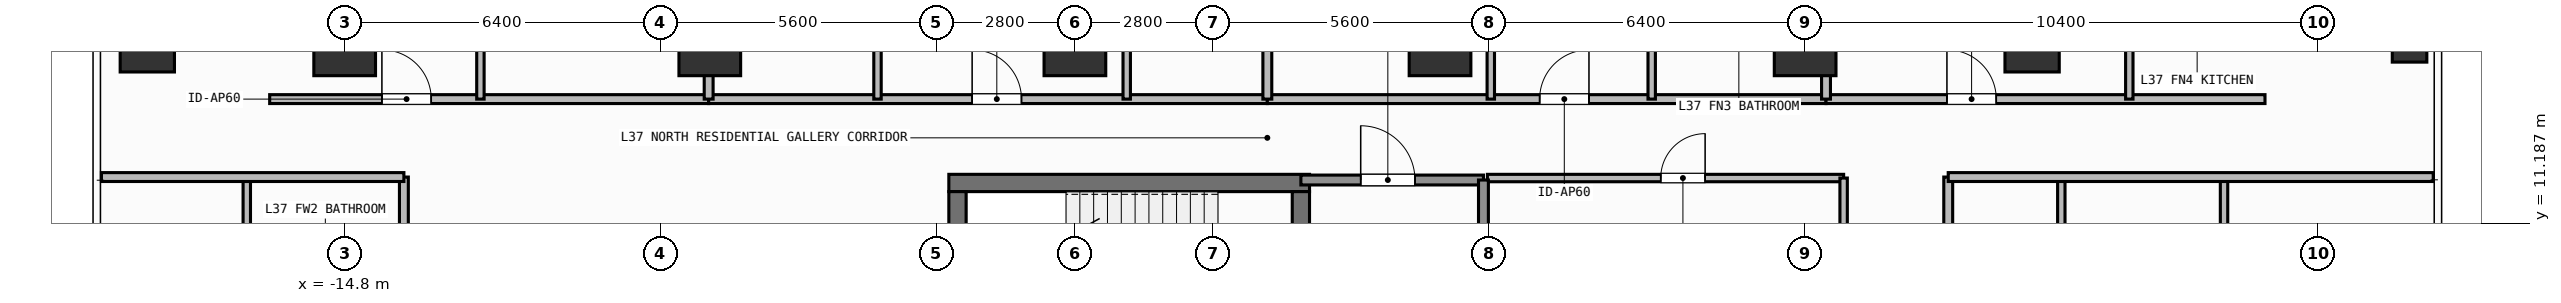
"""IFC4 building model, lengths in metres.
Left out: names, types, materials, properties, quantities, classifications, styles, units other than length and angle.
Written with IfcOpenShell. Run it as: python <this file> out.ifc"""

import sys

from ifc_helpers import new_model, si_unit, direction, frame, frame_2d, origin, origin_2d, place, context, subcontext, project, spatial, rectangle, hollow_rectangle, extrude, element, fill, save


model = new_model("IFC4")
c1 = context("Model", 3, precision=1e-05, world=origin(), true_north=direction((0.0, 1.0)))
c2 = subcontext(c1, "Body", "Model", "MODEL_VIEW")
j1 = project(units=[si_unit("LENGTHUNIT", "METRE"), si_unit("PLANEANGLEUNIT", "RADIAN")], contexts=[c1])
p1 = place(None, origin())
s1 = spatial("IfcSite", under=j1, at=p1, CompositionType="ELEMENT")
p2 = place(p1, origin())
s2 = spatial("IfcBuilding", under=s1, at=p2, CompositionType="ELEMENT")
p3 = place(p2, frame((0.0, 0.0, 148.5)))
s3 = spatial("IfcBuildingStorey", under=s2, at=p3, CompositionType="ELEMENT", Elevation=148.5)
p4 = place(p3, frame((-2.555, 12.0, 0.0), z_axis=(0.0, 0.0, 1.0), x_axis=(1.0, 0.0, 0.0)))
e1 = element("IfcWall", 1, at=p4, inside=s3, PredefinedType="SHEAR", context=c2, shape_type="SweptSolid", body=[
    extrude(rectangle(XDim=7.31, YDim=0.35, at=frame_2d((3.655, 0.0))), origin(), (0.0, 0.0, 1.0), 3.9),
])
p5 = place(p3, frame((-2.38, 8.9, 0.0), z_axis=(0.0, 0.0, 1.0), x_axis=(0.0, 1.0, 0.0)))
e2 = element("IfcWall", 2, at=p5, inside=s3, PredefinedType="SHEAR", context=c2, shape_type="SweptSolid", body=[
    extrude(rectangle(XDim=2.925, YDim=0.35, at=frame_2d((1.462, 0.0))), origin(), (0.0, 0.0, 1.0), 3.9),
])
p6 = place(p3, frame((4.58, 11.825, 0.0), z_axis=(0.0, 0.0, 1.0), x_axis=(0.0, -1.0, 0.0)))
e3 = element("IfcWall", 3, at=p6, inside=s3, PredefinedType="SHEAR", context=c2, shape_type="SweptSolid", body=[
    extrude(rectangle(XDim=2.925, YDim=0.35, at=frame_2d((1.462, 0.0))), origin(), (0.0, 0.0, 1.0), 3.9),
])
p7 = place(p6, frame((0.913, 0.0, 0.0)))
e4 = element("IfcOpeningElement", 4, at=p7, cuts=e3, PredefinedType="OPENING", context=c2, shape_type="SweptSolid", body=[
    extrude(rectangle(XDim=1.1, YDim=2.15, at=frame_2d((0.55, 1.075))), frame((0.0, 0.185, 0.0), z_axis=(0.0, -1.0, 0.0), x_axis=(1.0, 0.0, 0.0)), (0.0, 0.0, 1.0), 0.37),
])
for number, where, z_axis, x_axis in (
    (5, (-14.8, 14.8, 0.0), (0.0, 0.0, 1.0), (1.0, 0.0, 0.0)),
    (6, (-7.4, 14.8, 0.0), (0.0, 0.0, 1.0), (1.0, 0.0, 0.0)),
    (7, (0.0, 14.8, 0.0), (0.0, 0.0, 1.0), (1.0, 0.0, 0.0)),
    (8, (7.4, 14.8, 0.0), (0.0, 0.0, 1.0), (1.0, 0.0, 0.0)),
    (9, (14.8, 14.8, 0.0), (0.0, 0.0, 1.0), (1.0, 0.0, 0.0)),
):
    element("IfcColumn", number, at=place(p3, frame(where, z_axis=z_axis, x_axis=x_axis)), inside=s3, PredefinedType="COLUMN", context=c2, shape_type="SweptSolid", body=[
        extrude(rectangle(XDim=1.25, YDim=1.25, at=origin_2d()), origin(), (0.0, 0.0, 1.0), 3.9),
    ])
for number, where, z_axis, x_axis in (
    (10, (-18.8, 14.8, 0.0), (0.0, 0.0, 1.0), (1.0, 0.0, 0.0)),
    (11, (19.4, 14.8, 0.0), (0.0, 0.0, 1.0), (1.0, 0.0, 0.0)),
):
    element("IfcColumn", number, at=place(p3, frame(where, z_axis=z_axis, x_axis=x_axis)), inside=s3, PredefinedType="COLUMN", context=c2, shape_type="SweptSolid", body=[
        extrude(rectangle(XDim=1.1, YDim=1.1, at=origin_2d()), origin(), (0.0, 0.0, 1.0), 3.9),
    ])
p8 = place(p3, frame((27.05, 14.8, 0.0), z_axis=(0.0, 0.0, 1.0), x_axis=(1.0, 0.0, 0.0)))
e12 = element("IfcColumn", 12, at=p8, inside=s3, PredefinedType="COLUMN", context=c2, shape_type="SweptSolid", body=[
    extrude(hollow_rectangle(XDim=0.7, YDim=0.7, WallThickness=0.032, at=origin_2d()), origin(), (0.0, 0.0, 1.0), 3.9),
])
p9 = place(p3, frame((4.58, 12.06, 0.0), z_axis=(0.0, 0.0, 1.0), x_axis=(1.0, 0.0, 0.0)))
e13 = element("IfcWall", 13, at=p9, inside=s3, PredefinedType="SOLIDWALL", context=c2, shape_type="SweptSolid", body=[
    extrude(rectangle(XDim=3.7, YDim=0.2, at=frame_2d((1.85, 0.0))), origin(), (0.0, 0.0, 1.0), 3.68),
])
p10 = place(p9, frame((1.212, 0.0, 0.0)))
e14 = element("IfcOpeningElement", 14, at=p10, cuts=e13, PredefinedType="OPENING", context=c2, shape_type="SweptSolid", body=[
    extrude(rectangle(XDim=1.1, YDim=2.15, at=frame_2d((0.55, 1.075))), frame((0.0, 0.11, 0.0), z_axis=(0.0, -1.0, 0.0), x_axis=(1.0, 0.0, 0.0)), (0.0, 0.0, 1.0), 0.22),
])
p11 = place(p3, frame((8.36, 12.1, 0.0), z_axis=(0.0, 0.0, 1.0), x_axis=(1.0, 0.0, 0.0)))
e15 = element("IfcWall", 15, at=p11, inside=s3, PredefinedType="PARTITIONING", context=c2, shape_type="SweptSolid", body=[
    extrude(rectangle(XDim=7.22, YDim=0.15, at=frame_2d((3.61, 0.0))), origin(), (0.0, 0.0, 1.0), 3.68),
])
p12 = place(p11, frame((3.513, 0.0, 0.0)))
e16 = element("IfcOpeningElement", 16, at=p12, cuts=e15, PredefinedType="OPENING", context=c2, shape_type="SweptSolid", body=[
    extrude(rectangle(XDim=0.9, YDim=2.1, at=frame_2d((0.45, 1.05))), frame((0.0, 0.085, 0.0), z_axis=(0.0, -1.0, 0.0), x_axis=(1.0, 0.0, 0.0)), (0.0, 0.0, 1.0), 0.17),
])
p13 = place(p3, frame((-16.32, 13.7, 0.0), z_axis=(0.0, 0.0, 1.0), x_axis=(1.0, 0.0, 0.0)))
e17 = element("IfcWall", 17, at=p13, inside=s3, PredefinedType="PARTITIONING", context=c2, shape_type="SweptSolid", body=[
    extrude(rectangle(XDim=8.897, YDim=0.18, at=frame_2d((4.448, 0.0))), origin(), (0.0, 0.0, 1.0), 3.68),
])
p14 = place(p13, frame((2.274, 0.0, 0.0)))
e18 = element("IfcOpeningElement", 18, at=p14, cuts=e17, PredefinedType="OPENING", context=c2, shape_type="SweptSolid", body=[
    extrude(rectangle(XDim=1.0, YDim=2.2, at=frame_2d((0.5, 1.1))), frame((0.0, 0.1, 0.0), z_axis=(0.0, -1.0, 0.0), x_axis=(1.0, 0.0, 0.0)), (0.0, 0.0, 1.0), 0.2),
])
p15 = place(p3, frame((-12.049, 13.7, 0.0), z_axis=(0.0, 0.0, 1.0), x_axis=(0.0, 1.0, 0.0)))
e19 = element("IfcWall", 19, at=p15, inside=s3, PredefinedType="PARTITIONING", context=c2, shape_type="SweptSolid", body=[
    extrude(rectangle(XDim=3.138, YDim=0.15, at=frame_2d((1.569, 0.0))), origin(), (0.0, 0.0, 1.0), 3.68),
])
p16 = place(p15, frame((1.233, 0.0, 0.0)))
e20 = element("IfcOpeningElement", 20, at=p16, cuts=e19, PredefinedType="OPENING", context=c2, shape_type="SweptSolid", body=[
    extrude(rectangle(XDim=0.85, YDim=2.1, at=frame_2d((0.425, 1.05))), frame((0.0, 0.085, 0.0), z_axis=(0.0, -1.0, 0.0), x_axis=(1.0, 0.0, 0.0)), (0.0, 0.0, 1.0), 0.17),
])
p17 = place(p3, frame((-7.423, 13.7, 0.0), z_axis=(0.0, 0.0, 1.0), x_axis=(1.0, 0.0, 0.0)))
e21 = element("IfcWall", 21, at=p17, inside=s3, PredefinedType="PARTITIONING", context=c2, shape_type="SweptSolid", body=[
    extrude(rectangle(XDim=11.323, YDim=0.18, at=frame_2d((5.662, 0.0))), origin(), (0.0, 0.0, 1.0), 3.68),
])
p18 = place(p17, frame((5.34, 0.0, 0.0)))
e22 = element("IfcOpeningElement", 22, at=p18, cuts=e21, PredefinedType="OPENING", context=c2, shape_type="SweptSolid", body=[
    extrude(rectangle(XDim=1.0, YDim=2.2, at=frame_2d((0.5, 1.1))), frame((0.0, 0.1, 0.0), z_axis=(0.0, -1.0, 0.0), x_axis=(1.0, 0.0, 0.0)), (0.0, 0.0, 1.0), 0.2),
])
p19 = place(p3, frame((-4.001, 13.7, 0.0), z_axis=(0.0, 0.0, 1.0), x_axis=(0.0, 1.0, 0.0)))
e23 = element("IfcWall", 23, at=p19, inside=s3, PredefinedType="PARTITIONING", context=c2, shape_type="SweptSolid", body=[
    extrude(rectangle(XDim=5.845, YDim=0.15, at=frame_2d((2.922, 0.0))), origin(), (0.0, 0.0, 1.0), 3.68),
])
p20 = place(p19, frame((2.498, 0.0, 0.0)))
e24 = element("IfcOpeningElement", 24, at=p20, cuts=e23, PredefinedType="OPENING", context=c2, shape_type="SweptSolid", body=[
    extrude(rectangle(XDim=0.85, YDim=2.1, at=frame_2d((0.425, 1.05))), frame((0.0, 0.085, 0.0), z_axis=(0.0, -1.0, 0.0), x_axis=(1.0, 0.0, 0.0)), (0.0, 0.0, 1.0), 0.17),
])
p21 = place(p3, frame((1.05, 13.7, 0.0), z_axis=(0.0, 0.0, 1.0), x_axis=(0.0, 1.0, 0.0)))
e25 = element("IfcWall", 25, at=p21, inside=s3, PredefinedType="PARTITIONING", context=c2, shape_type="SweptSolid", body=[
    extrude(rectangle(XDim=5.845, YDim=0.15, at=frame_2d((2.922, 0.0))), origin(), (0.0, 0.0, 1.0), 3.68),
])
p22 = place(p21, frame((2.498, 0.0, 0.0)))
e26 = element("IfcOpeningElement", 26, at=p22, cuts=e25, PredefinedType="OPENING", context=c2, shape_type="SweptSolid", body=[
    extrude(rectangle(XDim=0.85, YDim=2.1, at=frame_2d((0.425, 1.05))), frame((0.0, 0.085, 0.0), z_axis=(0.0, -1.0, 0.0), x_axis=(1.0, 0.0, 0.0)), (0.0, 0.0, 1.0), 0.17),
])
p23 = place(p3, frame((3.9, 13.7, 0.0), z_axis=(0.0, 0.0, 1.0), x_axis=(1.0, 0.0, 0.0)))
e27 = element("IfcWall", 27, at=p23, inside=s3, PredefinedType="PARTITIONING", context=c2, shape_type="SweptSolid", body=[
    extrude(rectangle(XDim=11.323, YDim=0.18, at=frame_2d((5.662, 0.0))), origin(), (0.0, 0.0, 1.0), 3.68),
])
p24 = place(p23, frame((5.519, 0.0, 0.0)))
e28 = element("IfcOpeningElement", 28, at=p24, cuts=e27, PredefinedType="OPENING", context=c2, shape_type="SweptSolid", body=[
    extrude(rectangle(XDim=1.0, YDim=2.2, at=frame_2d((0.5, 1.1))), frame((0.0, 0.1, 0.0), z_axis=(0.0, -1.0, 0.0), x_axis=(1.0, 0.0, 0.0)), (0.0, 0.0, 1.0), 0.2),
])
p25 = place(p3, frame((8.429, 13.7, 0.0), z_axis=(0.0, 0.0, 1.0), x_axis=(0.0, 1.0, 0.0)))
e29 = element("IfcWall", 29, at=p25, inside=s3, PredefinedType="PARTITIONING", context=c2, shape_type="SweptSolid", body=[
    extrude(rectangle(XDim=5.69, YDim=0.15, at=frame_2d((2.845, 0.0))), origin(), (0.0, 0.0, 1.0), 3.68),
])
p26 = place(p25, frame((2.42, 0.0, 0.0)))
e30 = element("IfcOpeningElement", 30, at=p26, cuts=e29, PredefinedType="OPENING", context=c2, shape_type="SweptSolid", body=[
    extrude(rectangle(XDim=0.85, YDim=2.1, at=frame_2d((0.425, 1.05))), frame((0.0, 0.085, 0.0), z_axis=(0.0, -1.0, 0.0), x_axis=(1.0, 0.0, 0.0)), (0.0, 0.0, 1.0), 0.17),
])
p27 = place(p3, frame((11.69, 13.7, 0.0), z_axis=(0.0, 0.0, 1.0), x_axis=(0.0, 1.0, 0.0)))
e31 = element("IfcWall", 31, at=p27, inside=s3, PredefinedType="PARTITIONING", context=c2, shape_type="SweptSolid", body=[
    extrude(rectangle(XDim=5.69, YDim=0.15, at=frame_2d((2.845, 0.0))), origin(), (0.0, 0.0, 1.0), 3.68),
])
p28 = place(p27, frame((2.42, 0.0, 0.0)))
e32 = element("IfcOpeningElement", 32, at=p28, cuts=e31, PredefinedType="OPENING", context=c2, shape_type="SweptSolid", body=[
    extrude(rectangle(XDim=0.85, YDim=2.1, at=frame_2d((0.425, 1.05))), frame((0.0, 0.085, 0.0), z_axis=(0.0, -1.0, 0.0), x_axis=(1.0, 0.0, 0.0)), (0.0, 0.0, 1.0), 0.17),
])
p29 = place(p3, frame((15.223, 13.7, 0.0), z_axis=(0.0, 0.0, 1.0), x_axis=(1.0, 0.0, 0.0)))
e33 = element("IfcWall", 33, at=p29, inside=s3, PredefinedType="PARTITIONING", context=c2, shape_type="SweptSolid", body=[
    extrude(rectangle(XDim=8.897, YDim=0.18, at=frame_2d((4.449, 0.0))), origin(), (0.0, 0.0, 1.0), 3.68),
])
p30 = place(p29, frame((2.451, 0.0, 0.0)))
e34 = element("IfcOpeningElement", 34, at=p30, cuts=e33, PredefinedType="OPENING", context=c2, shape_type="SweptSolid", body=[
    extrude(rectangle(XDim=1.0, YDim=2.2, at=frame_2d((0.5, 1.1))), frame((0.0, 0.1, 0.0), z_axis=(0.0, -1.0, 0.0), x_axis=(1.0, 0.0, 0.0)), (0.0, 0.0, 1.0), 0.2),
])
p31 = place(p3, frame((21.37, 13.7, 0.0), z_axis=(0.0, 0.0, 1.0), x_axis=(0.0, 1.0, 0.0)))
e35 = element("IfcWall", 35, at=p31, inside=s3, PredefinedType="PARTITIONING", context=c2, shape_type="SweptSolid", body=[
    extrude(rectangle(XDim=3.129, YDim=0.15, at=frame_2d((1.564, 0.0))), origin(), (0.0, 0.0, 1.0), 3.68),
])
p32 = place(p31, frame((1.763, 0.0, 0.0)))
e36 = element("IfcOpeningElement", 36, at=p32, cuts=e35, PredefinedType="OPENING", context=c2, shape_type="SweptSolid", body=[
    extrude(rectangle(XDim=0.85, YDim=2.1, at=frame_2d((0.425, 1.05))), frame((0.0, 0.085, 0.0), z_axis=(0.0, -1.0, 0.0), x_axis=(1.0, 0.0, 0.0)), (0.0, 0.0, 1.0), 0.17),
])
p33 = place(p3, frame((-13.6, -1.164, 0.0), z_axis=(0.0, 0.0, 1.0), x_axis=(0.0, 1.0, 0.0)))
e37 = element("IfcWall", 37, at=p33, inside=s3, PredefinedType="PARTITIONING", context=c2, shape_type="SweptSolid", body=[
    extrude(rectangle(XDim=13.284, YDim=0.18, at=frame_2d((6.642, 0.0))), origin(), (0.0, 0.0, 1.0), 3.68),
])
p34 = place(p33, frame((6.231, 0.0, 0.0)))
e38 = element("IfcOpeningElement", 38, at=p34, cuts=e37, PredefinedType="OPENING", context=c2, shape_type="SweptSolid", body=[
    extrude(rectangle(XDim=1.0, YDim=2.2, at=frame_2d((0.5, 1.1))), frame((0.0, 0.1, 0.0), z_axis=(0.0, -1.0, 0.0), x_axis=(1.0, 0.0, 0.0)), (0.0, 0.0, 1.0), 0.2),
])
p35 = place(p3, frame((17.7, -12.12, 0.0), z_axis=(0.0, 0.0, 1.0), x_axis=(0.0, 1.0, 0.0)))
e39 = element("IfcWall", 39, at=p35, inside=s3, PredefinedType="PARTITIONING", context=c2, shape_type="SweptSolid", body=[
    extrude(rectangle(XDim=24.24, YDim=0.18, at=frame_2d((12.12, 0.0))), origin(), (0.0, 0.0, 1.0), 3.68),
])
p36 = place(p35, frame((11.62, 0.0, 0.0)))
e40 = element("IfcOpeningElement", 40, at=p36, cuts=e39, PredefinedType="OPENING", context=c2, shape_type="SweptSolid", body=[
    extrude(rectangle(XDim=1.0, YDim=2.2, at=frame_2d((0.5, 1.1))), frame((0.0, 0.1, 0.0), z_axis=(0.0, -1.0, 0.0), x_axis=(1.0, 0.0, 0.0)), (0.0, 0.0, 1.0), 0.2),
])
p37 = place(p3, frame((8.28, 8.875, 0.0), z_axis=(0.0, 0.0, 1.0), x_axis=(0.0, 1.0, 0.0)))
e41 = element("IfcWall", 41, at=p37, inside=s3, PredefinedType="SOLIDWALL", context=c2, shape_type="SweptSolid", body=[
    extrude(rectangle(XDim=3.185, YDim=0.2, at=frame_2d((1.593, 0.0))), origin(), (0.0, 0.0, 1.0), 3.68),
])
p38 = place(p3, frame((15.58, 5.85, 0.0), z_axis=(0.0, 0.0, 1.0), x_axis=(0.0, 1.0, 0.0)))
e42 = element("IfcWall", 42, at=p38, inside=s3, PredefinedType="PARTITIONING", context=c2, shape_type="SweptSolid", body=[
    extrude(rectangle(XDim=6.25, YDim=0.15, at=frame_2d((3.125, 0.0))), origin(), (0.0, 0.0, 1.0), 3.68),
])
p39 = place(p3, frame((-7.423, 13.7, 0.0), z_axis=(0.0, 0.0, 1.0), x_axis=(0.0, 1.0, 0.0)))
e43 = element("IfcWall", 43, at=p39, inside=s3, PredefinedType="PARTITIONING", context=c2, shape_type="SweptSolid", body=[
    extrude(rectangle(XDim=9.93, YDim=0.18, at=frame_2d((4.965, 0.0))), origin(), (0.0, 0.0, 1.0), 3.082),
])
for number, where, z_axis, x_axis in (
    (44, (3.9, 13.7, 0.0), (0.0, 0.0, 1.0), (0.0, 1.0, 0.0)),
    (45, (15.223, 13.7, 0.0), (0.0, 0.0, 1.0), (0.0, 1.0, 0.0)),
):
    element("IfcWall", number, at=place(p3, frame(where, z_axis=z_axis, x_axis=x_axis)), inside=s3, PredefinedType="PARTITIONING", context=c2, shape_type="SweptSolid", body=[
        extrude(rectangle(XDim=9.93, YDim=0.18, at=frame_2d((4.965, 0.0))), origin(), (0.0, 0.0, 1.0), 3.68),
    ])
p40 = place(p3, frame((-16.784, 8.394, 0.0), z_axis=(0.0, 0.0, 1.0), x_axis=(0.0, 1.0, 0.0)))
e46 = element("IfcWall", 46, at=p40, inside=s3, PredefinedType="PARTITIONING", context=c2, shape_type="SweptSolid", body=[
    extrude(rectangle(XDim=3.726, YDim=0.15, at=frame_2d((1.863, 0.0))), origin(), (0.0, 0.0, 1.0), 3.68),
])
p41 = place(p3, frame((-19.73, 12.12, 0.0), z_axis=(0.0, 0.0, 1.0), x_axis=(1.0, 0.0, 0.0)))
e47 = element("IfcWall", 47, at=p41, inside=s3, PredefinedType="PARTITIONING", context=c2, shape_type="SweptSolid", body=[
    extrude(rectangle(XDim=6.13, YDim=0.18, at=frame_2d((3.065, 0.0))), origin(), (0.0, 0.0, 1.0), 3.68),
])
for number, where, z_axis, x_axis in (
    (48, (19.992, 5.436, 0.0), (0.0, 0.0, 1.0), (0.0, 1.0, 0.0)),
    (49, (23.29, 5.436, 0.0), (0.0, 0.0, 1.0), (0.0, 1.0, 0.0)),
):
    element("IfcWall", number, at=place(p3, frame(where, z_axis=z_axis, x_axis=x_axis)), inside=s3, PredefinedType="PARTITIONING", context=c2, shape_type="SweptSolid", body=[
        extrude(rectangle(XDim=6.684, YDim=0.15, at=frame_2d((3.342, 0.0))), origin(), (0.0, 0.0, 1.0), 3.68),
    ])
p42 = place(p3, frame((17.7, 12.12, 0.0), z_axis=(0.0, 0.0, 1.0), x_axis=(1.0, 0.0, 0.0)))
e50 = element("IfcWall", 50, at=p42, inside=s3, PredefinedType="PARTITIONING", context=c2, shape_type="SweptSolid", body=[
    extrude(rectangle(XDim=9.83, YDim=0.18, at=frame_2d((4.915, 0.0))), origin(), (0.0, 0.0, 1.0), 3.68),
])
p43 = place(p10, origin())
e51 = element("IfcDoor", 51, at=p43, inside=s3, OperationType="SINGLE_SWING_LEFT", PredefinedType="DOOR", context=c2, shape_type="SweptSolid", body=[
    extrude(rectangle(XDim=1.1, YDim=2.15, at=frame_2d((0.55, 1.075))), frame((0.0, 0.025, 0.0), z_axis=(0.0, -1.0, 0.0), x_axis=(1.0, 0.0, 0.0)), (0.0, 0.0, 1.0), 0.05),
])
fill(e14, e51)
p44 = place(p12, origin())
e52 = element("IfcDoor", 52, at=p44, inside=s3, OperationType="SINGLE_SWING_RIGHT", PredefinedType="DOOR", context=c2, shape_type="SweptSolid", body=[
    extrude(rectangle(XDim=0.9, YDim=2.1, at=frame_2d((0.45, 1.05))), frame((0.0, 0.025, 0.0), z_axis=(0.0, -1.0, 0.0), x_axis=(1.0, 0.0, 0.0)), (0.0, 0.0, 1.0), 0.05),
])
fill(e16, e52)
p45 = place(p14, origin())
e53 = element("IfcDoor", 53, at=p45, inside=s3, OperationType="SINGLE_SWING_LEFT", PredefinedType="DOOR", context=c2, shape_type="SweptSolid", body=[
    extrude(rectangle(XDim=1.0, YDim=2.2, at=frame_2d((0.5, 1.1))), frame((0.0, 0.025, 0.0), z_axis=(0.0, -1.0, 0.0), x_axis=(1.0, 0.0, 0.0)), (0.0, 0.0, 1.0), 0.05),
])
fill(e18, e53)
p46 = place(p18, origin())
e54 = element("IfcDoor", 54, at=p46, inside=s3, OperationType="SINGLE_SWING_LEFT", PredefinedType="DOOR", context=c2, shape_type="SweptSolid", body=[
    extrude(rectangle(XDim=1.0, YDim=2.2, at=frame_2d((0.5, 1.1))), frame((0.0, 0.025, 0.0), z_axis=(0.0, -1.0, 0.0), x_axis=(1.0, 0.0, 0.0)), (0.0, 0.0, 1.0), 0.05),
])
fill(e22, e54)
p47 = place(p24, origin())
e55 = element("IfcDoor", 55, at=p47, inside=s3, OperationType="SINGLE_SWING_RIGHT", PredefinedType="DOOR", context=c2, shape_type="SweptSolid", body=[
    extrude(rectangle(XDim=1.0, YDim=2.2, at=frame_2d((0.5, 1.1))), frame((0.0, 0.025, 0.0), z_axis=(0.0, -1.0, 0.0), x_axis=(1.0, 0.0, 0.0)), (0.0, 0.0, 1.0), 0.05),
])
fill(e28, e55)
p48 = place(p30, origin())
e56 = element("IfcDoor", 56, at=p48, inside=s3, OperationType="SINGLE_SWING_LEFT", PredefinedType="DOOR", context=c2, shape_type="SweptSolid", body=[
    extrude(rectangle(XDim=1.0, YDim=2.2, at=frame_2d((0.5, 1.1))), frame((0.0, 0.025, 0.0), z_axis=(0.0, -1.0, 0.0), x_axis=(1.0, 0.0, 0.0)), (0.0, 0.0, 1.0), 0.05),
])
fill(e34, e56)
save(model, sys.argv[1])
